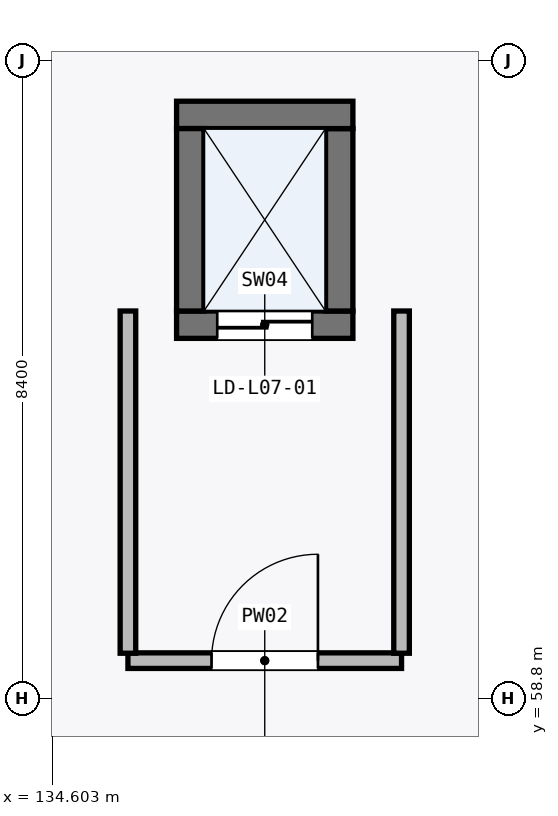
"""IFC4 building model, lengths in metres.
Left out: names, types, materials, properties, quantities, classifications, styles, units other than length and angle.
Written with IfcOpenShell. Run it as: python <this file> out.ifc"""

import sys

from ifc_helpers import new_model, si_unit, direction, frame, frame_2d, origin, place, context, subcontext, project, spatial, rectangle, extrude, element, fill, save


model = new_model("IFC4")
c1 = context("Model", 3, precision=1e-05, world=origin(), true_north=direction((0.0, 1.0)))
c2 = subcontext(c1, "Body", "Model", "MODEL_VIEW")
j1 = project(units=[si_unit("LENGTHUNIT", "METRE"), si_unit("PLANEANGLEUNIT", "RADIAN")], contexts=[c1])
p1 = place(None, origin())
s1 = spatial("IfcSite", under=j1, at=p1, CompositionType="ELEMENT")
p2 = place(p1, origin())
s2 = spatial("IfcBuilding", under=s1, at=p2, CompositionType="ELEMENT")
p3 = place(p2, frame((0.0, 0.0, 31.8)))
s3 = spatial("IfcBuildingStorey", under=s2, at=p3, CompositionType="ELEMENT", Elevation=31.8)
p4 = place(p3, frame((136.24, 63.72, 0.0), z_axis=(0.0, 0.0, 1.0), x_axis=(1.0, 0.0, 0.0)))
e1 = element("IfcWall", 1, at=p4, inside=s3, PredefinedType="SHEAR", context=c2, shape_type="SweptSolid", body=[
    extrude(rectangle(XDim=2.32, YDim=0.36, at=frame_2d((1.16, 0.0))), origin(), (0.0, 0.0, 1.0), 4.245),
])
p5 = place(p4, frame((0.535, 0.0, 0.0)))
e2 = element("IfcOpeningElement", 2, at=p5, cuts=e1, PredefinedType="OPENING", context=c2, shape_type="SweptSolid", body=[
    extrude(rectangle(XDim=1.25, YDim=2.2, at=frame_2d((0.625, 1.1))), frame((0.0, 0.19, 0.0), z_axis=(0.0, -1.0, 0.0), x_axis=(1.0, 0.0, 0.0)), (0.0, 0.0, 1.0), 0.38),
])
p6 = place(p3, frame((138.38, 63.9, 0.0), z_axis=(0.0, 0.0, 1.0), x_axis=(0.0, 1.0, 0.0)))
e3 = element("IfcWall", 3, at=p6, inside=s3, PredefinedType="SHEAR", context=c2, shape_type="SweptSolid", body=[
    extrude(rectangle(XDim=2.4, YDim=0.36, at=frame_2d((1.2, 0.0))), origin(), (0.0, 0.0, 1.0), 4.245),
])
p7 = place(p3, frame((138.56, 66.48, 0.0), z_axis=(0.0, 0.0, 1.0), x_axis=(-1.0, 0.0, 0.0)))
e4 = element("IfcWall", 4, at=p7, inside=s3, PredefinedType="SHEAR", context=c2, shape_type="SweptSolid", body=[
    extrude(rectangle(XDim=2.32, YDim=0.36, at=frame_2d((1.16, 0.0))), origin(), (0.0, 0.0, 1.0), 4.245),
])
p8 = place(p3, frame((136.42, 66.3, 0.0), z_axis=(0.0, 0.0, 1.0), x_axis=(0.0, -1.0, 0.0)))
e5 = element("IfcWall", 5, at=p8, inside=s3, PredefinedType="SHEAR", context=c2, shape_type="SweptSolid", body=[
    extrude(rectangle(XDim=2.4, YDim=0.36, at=frame_2d((1.2, 0.0))), origin(), (0.0, 0.0, 1.0), 4.245),
])
p9 = place(p3, frame((135.6, 59.3, 0.0), z_axis=(0.0, 0.0, 1.0), x_axis=(1.0, 0.0, 0.0)))
e6 = element("IfcWall", 6, at=p9, inside=s3, PredefinedType="PARTITIONING", context=c2, shape_type="SweptSolid", body=[
    extrude(rectangle(XDim=3.6, YDim=0.205, at=frame_2d((1.8, 0.0))), origin(), (0.0, 0.0, 1.0), 4.245),
])
p10 = place(p9, frame((1.1, 0.0, 0.0)))
e7 = element("IfcOpeningElement", 7, at=p10, cuts=e6, PredefinedType="OPENING", context=c2, shape_type="SweptSolid", body=[
    extrude(rectangle(XDim=1.4, YDim=2.15, at=frame_2d((0.7, 1.075))), frame((0.0, 0.113, 0.0), z_axis=(0.0, -1.0, 0.0), x_axis=(1.0, 0.0, 0.0)), (0.0, 0.0, 1.0), 0.225),
])
for number, where, z_axis, x_axis in (
    (8, (139.2, 59.397, 0.0), (0.0, 0.0, 1.0), (0.0, 1.0, 0.0)),
    (9, (135.6, 63.9, 0.0), (0.0, 0.0, 1.0), (0.0, -1.0, 0.0)),
):
    element("IfcWall", number, at=place(p3, frame(where, z_axis=z_axis, x_axis=x_axis)), inside=s3, PredefinedType="PARTITIONING", context=c2, shape_type="SweptSolid", body=[
        extrude(rectangle(XDim=4.502, YDim=0.205, at=frame_2d((2.251, 0.0))), origin(), (0.0, 0.0, 1.0), 4.245),
    ])
p11 = place(p5, frame((1.25, 0.0, 0.0), z_axis=(0.0, 0.0, 1.0), x_axis=(-1.0, 0.0, 0.0)))
e10 = element("IfcDoor", 10, at=p11, inside=s3, OperationType="DOUBLE_DOOR_SLIDING", PredefinedType="DOOR", context=c2, shape_type="SweptSolid", body=[
    extrude(rectangle(XDim=1.25, YDim=2.2, at=frame_2d((0.625, 1.1))), frame((0.0, 0.025, 0.0), z_axis=(0.0, -1.0, 0.0), x_axis=(1.0, 0.0, 0.0)), (0.0, 0.0, 1.0), 0.05),
])
fill(e2, e10)
p12 = place(p10, origin())
e11 = element("IfcDoor", 11, at=p12, inside=s3, OperationType="SINGLE_SWING_RIGHT", PredefinedType="DOOR", context=c2, shape_type="SweptSolid", body=[
    extrude(rectangle(XDim=1.4, YDim=2.15, at=frame_2d((0.7, 1.075))), frame((0.0, 0.025, 0.0), z_axis=(0.0, -1.0, 0.0), x_axis=(1.0, 0.0, 0.0)), (0.0, 0.0, 1.0), 0.05),
])
fill(e7, e11)
save(model, sys.argv[1])
